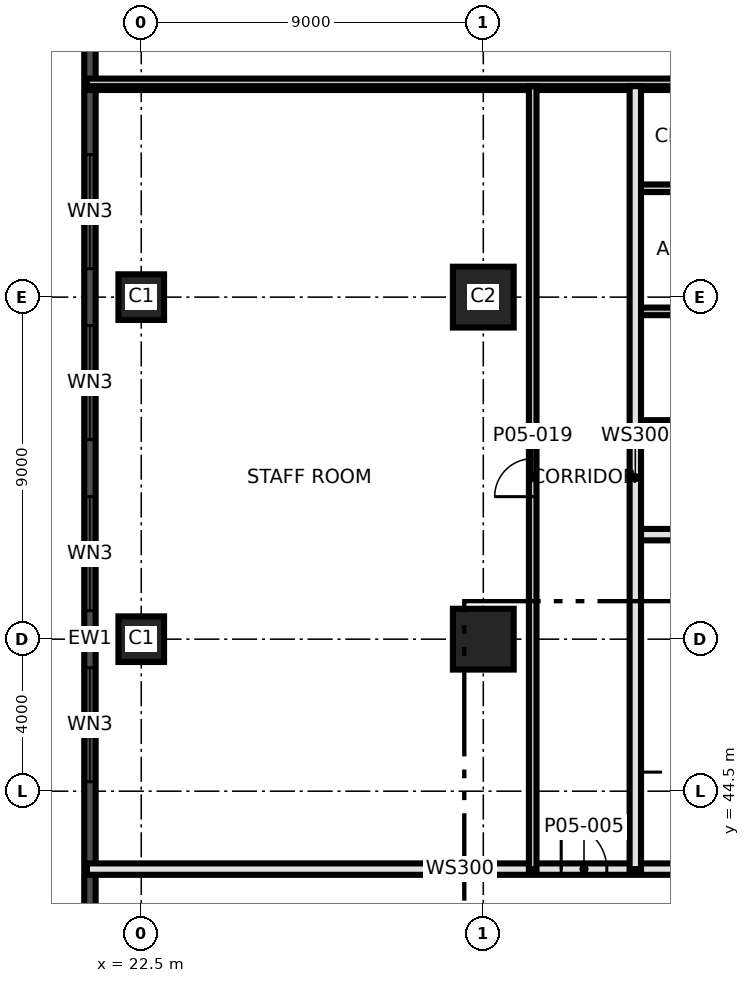
"""IFC4 building model, lengths in metres.
Left out: names, types, materials, properties, quantities, classifications, styles, units other than length and angle.
Written with IfcOpenShell. Run it as: python <this file> out.ifc"""

import sys

from ifc_helpers import new_model, si_unit, direction, frame, frame_2d, origin, origin_2d, place, context, subcontext, project, spatial, rectangle, extrude, element, fill, save


model = new_model("IFC4")
c1 = context("Model", 3, precision=1e-05, world=origin(), true_north=direction((0.0, 1.0)))
c2 = subcontext(c1, "Body", "Model", "MODEL_VIEW")
j1 = project(units=[si_unit("LENGTHUNIT", "METRE"), si_unit("PLANEANGLEUNIT", "RADIAN")], contexts=[c1])
p1 = place(None, origin())
s1 = spatial("IfcSite", under=j1, at=p1, CompositionType="ELEMENT")
p2 = place(p1, origin())
s2 = spatial("IfcBuilding", under=s1, at=p2, CompositionType="ELEMENT")
p3 = place(p2, frame((0.0, 0.0, 28.5)))
s3 = spatial("IfcBuildingStorey", under=s2, at=p3, CompositionType="ELEMENT", Elevation=28.5)
p4 = place(p3, frame((22.5, 48.5, 0.0), z_axis=(0.0, 0.0, 1.0), x_axis=(1.0, 0.0, 0.0)))
e1 = element("IfcColumn", 1, at=p4, inside=s3, PredefinedType="COLUMN", context=c2, shape_type="SweptSolid", body=[
    extrude(rectangle(XDim=1.2, YDim=1.2, at=origin_2d()), origin(), (0.0, 0.0, 1.0), 5.0),
])
p5 = place(p3, frame((31.5, 48.5, 0.0), z_axis=(0.0, 0.0, 1.0), x_axis=(1.0, 0.0, 0.0)))
e2 = element("IfcColumn", 2, at=p5, inside=s3, PredefinedType="COLUMN", context=c2, shape_type="SweptSolid", body=[
    extrude(rectangle(XDim=1.6, YDim=1.6, at=origin_2d()), origin(), (0.0, 0.0, 1.0), 5.0),
])
p6 = place(p3, frame((22.5, 57.5, 0.0), z_axis=(0.0, 0.0, 1.0), x_axis=(1.0, 0.0, 0.0)))
e3 = element("IfcColumn", 3, at=p6, inside=s3, PredefinedType="COLUMN", context=c2, shape_type="SweptSolid", body=[
    extrude(rectangle(XDim=1.2, YDim=1.2, at=origin_2d()), origin(), (0.0, 0.0, 1.0), 5.0),
])
p7 = place(p3, frame((31.5, 57.5, 0.0), z_axis=(0.0, 0.0, 1.0), x_axis=(1.0, 0.0, 0.0)))
e4 = element("IfcColumn", 4, at=p7, inside=s3, PredefinedType="COLUMN", context=c2, shape_type="SweptSolid", body=[
    extrude(rectangle(XDim=1.6, YDim=1.6, at=origin_2d()), origin(), (0.0, 0.0, 1.0), 5.0),
])
p8 = place(p3, frame((21.15, 79.952, 0.0), z_axis=(0.0, 0.0, 1.0), x_axis=(0.0, -1.0, 0.0)))
e5 = element("IfcWall", 5, at=p8, inside=s3, PredefinedType="SOLIDWALL", context=c2, shape_type="SweptSolid", body=[
    extrude(rectangle(XDim=62.88, YDim=0.3, at=frame_2d((31.44, 0.0))), origin(), (0.0, 0.0, 1.0), 4.7),
])
p9 = place(p8, frame((0.726, 0.0, 0.9)))
e6 = element("IfcOpeningElement", 6, at=p9, cuts=e5, PredefinedType="OPENING", context=c2, shape_type="SweptSolid", body=[
    extrude(rectangle(XDim=3.0, YDim=2.4, at=frame_2d((1.5, 1.2))), frame((0.0, 0.16, 0.0), z_axis=(0.0, -1.0, 0.0), x_axis=(1.0, 0.0, 0.0)), (0.0, 0.0, 1.0), 0.32),
])
p10 = place(p8, frame((5.202, 0.0, 0.9)))
e7 = element("IfcOpeningElement", 7, at=p10, cuts=e5, PredefinedType="OPENING", context=c2, shape_type="SweptSolid", body=[
    extrude(rectangle(XDim=3.0, YDim=2.4, at=frame_2d((1.5, 1.2))), frame((0.0, 0.16, 0.0), z_axis=(0.0, -1.0, 0.0), x_axis=(1.0, 0.0, 0.0)), (0.0, 0.0, 1.0), 0.32),
])
p11 = place(p8, frame((9.702, 0.0, 0.9)))
e8 = element("IfcOpeningElement", 8, at=p11, cuts=e5, PredefinedType="OPENING", context=c2, shape_type="SweptSolid", body=[
    extrude(rectangle(XDim=3.0, YDim=2.4, at=frame_2d((1.5, 1.2))), frame((0.0, 0.16, 0.0), z_axis=(0.0, -1.0, 0.0), x_axis=(1.0, 0.0, 0.0)), (0.0, 0.0, 1.0), 0.32),
])
p12 = place(p8, frame((18.702, 0.0, 0.9)))
e9 = element("IfcOpeningElement", 9, at=p12, cuts=e5, PredefinedType="OPENING", context=c2, shape_type="SweptSolid", body=[
    extrude(rectangle(XDim=3.0, YDim=2.4, at=frame_2d((1.5, 1.2))), frame((0.0, 0.16, 0.0), z_axis=(0.0, -1.0, 0.0), x_axis=(1.0, 0.0, 0.0)), (0.0, 0.0, 1.0), 0.32),
])
p13 = place(p8, frame((23.202, 0.0, 0.9)))
e10 = element("IfcOpeningElement", 10, at=p13, cuts=e5, PredefinedType="OPENING", context=c2, shape_type="SweptSolid", body=[
    extrude(rectangle(XDim=3.0, YDim=2.4, at=frame_2d((1.5, 1.2))), frame((0.0, 0.16, 0.0), z_axis=(0.0, -1.0, 0.0), x_axis=(1.0, 0.0, 0.0)), (0.0, 0.0, 1.0), 0.32),
])
p14 = place(p8, frame((27.702, 0.0, 0.9)))
e11 = element("IfcOpeningElement", 11, at=p14, cuts=e5, PredefinedType="OPENING", context=c2, shape_type="SweptSolid", body=[
    extrude(rectangle(XDim=3.0, YDim=2.4, at=frame_2d((1.5, 1.2))), frame((0.0, 0.16, 0.0), z_axis=(0.0, -1.0, 0.0), x_axis=(1.0, 0.0, 0.0)), (0.0, 0.0, 1.0), 0.32),
])
p15 = place(p8, frame((32.202, 0.0, 0.9)))
e12 = element("IfcOpeningElement", 12, at=p15, cuts=e5, PredefinedType="OPENING", context=c2, shape_type="SweptSolid", body=[
    extrude(rectangle(XDim=3.0, YDim=2.4, at=frame_2d((1.5, 1.2))), frame((0.0, 0.16, 0.0), z_axis=(0.0, -1.0, 0.0), x_axis=(1.0, 0.0, 0.0)), (0.0, 0.0, 1.0), 0.32),
])
p16 = place(p8, frame((41.202, 0.0, 0.9)))
e13 = element("IfcOpeningElement", 13, at=p16, cuts=e5, PredefinedType="OPENING", context=c2, shape_type="SweptSolid", body=[
    extrude(rectangle(XDim=3.0, YDim=2.4, at=frame_2d((1.5, 1.2))), frame((0.0, 0.16, 0.0), z_axis=(0.0, -1.0, 0.0), x_axis=(1.0, 0.0, 0.0)), (0.0, 0.0, 1.0), 0.32),
])
p17 = place(p8, frame((45.702, 0.0, 0.9)))
e14 = element("IfcOpeningElement", 14, at=p17, cuts=e5, PredefinedType="OPENING", context=c2, shape_type="SweptSolid", body=[
    extrude(rectangle(XDim=3.0, YDim=2.4, at=frame_2d((1.5, 1.2))), frame((0.0, 0.16, 0.0), z_axis=(0.0, -1.0, 0.0), x_axis=(1.0, 0.0, 0.0)), (0.0, 0.0, 1.0), 0.32),
])
p18 = place(p8, frame((50.202, 0.0, 0.9)))
e15 = element("IfcOpeningElement", 15, at=p18, cuts=e5, PredefinedType="OPENING", context=c2, shape_type="SweptSolid", body=[
    extrude(rectangle(XDim=3.0, YDim=2.4, at=frame_2d((1.5, 1.2))), frame((0.0, 0.16, 0.0), z_axis=(0.0, -1.0, 0.0), x_axis=(1.0, 0.0, 0.0)), (0.0, 0.0, 1.0), 0.32),
])
p19 = place(p8, frame((54.702, 0.0, 0.9)))
e16 = element("IfcOpeningElement", 16, at=p19, cuts=e5, PredefinedType="OPENING", context=c2, shape_type="SweptSolid", body=[
    extrude(rectangle(XDim=3.0, YDim=2.4, at=frame_2d((1.5, 1.2))), frame((0.0, 0.16, 0.0), z_axis=(0.0, -1.0, 0.0), x_axis=(1.0, 0.0, 0.0)), (0.0, 0.0, 1.0), 0.32),
])
p20 = place(p8, frame((59.226, 0.0, 0.9)))
e17 = element("IfcOpeningElement", 17, at=p20, cuts=e5, PredefinedType="OPENING", context=c2, shape_type="SweptSolid", body=[
    extrude(rectangle(XDim=3.0, YDim=2.4, at=frame_2d((1.5, 1.2))), frame((0.0, 0.16, 0.0), z_axis=(0.0, -1.0, 0.0), x_axis=(1.0, 0.0, 0.0)), (0.0, 0.0, 1.0), 0.32),
])
p21 = place(p3, frame((21.07, 42.45, 0.0), z_axis=(0.0, 0.0, 1.0), x_axis=(1.0, 0.0, 0.0)))
e18 = element("IfcWall", 18, at=p21, inside=s3, PredefinedType="SOLIDWALL", context=c2, shape_type="SweptSolid", body=[
    extrude(rectangle(XDim=19.63, YDim=0.3, at=frame_2d((9.815, 0.0))), origin(), (0.0, 0.0, 1.0), 4.7),
])
p22 = place(p21, frame((16.13, 0.0, 0.0)))
e19 = element("IfcOpeningElement", 19, at=p22, cuts=e18, PredefinedType="OPENING", context=c2, shape_type="SweptSolid", body=[
    extrude(rectangle(XDim=1.8, YDim=2.1, at=frame_2d((0.9, 1.05))), frame((0.0, 0.16, 0.0), z_axis=(0.0, -1.0, 0.0), x_axis=(1.0, 0.0, 0.0)), (0.0, 0.0, 1.0), 0.32),
])
p23 = place(p21, frame((12.48, 0.0, 0.0)))
e20 = element("IfcOpeningElement", 20, at=p23, cuts=e18, PredefinedType="OPENING", context=c2, shape_type="SweptSolid", body=[
    extrude(rectangle(XDim=1.2, YDim=2.1, at=frame_2d((0.6, 1.05))), frame((0.0, 0.16, 0.0), z_axis=(0.0, -1.0, 0.0), x_axis=(1.0, 0.0, 0.0)), (0.0, 0.0, 1.0), 0.32),
])
p24 = place(p3, frame((35.5, 51.25, 0.0), z_axis=(0.0, 0.0, 1.0), x_axis=(1.0, 0.0, 0.0)))
e21 = element("IfcWall", 21, at=p24, inside=s3, PredefinedType="SOLIDWALL", context=c2, shape_type="SweptSolid", body=[
    extrude(rectangle(XDim=5.2, YDim=0.3, at=frame_2d((2.6, 0.0))), origin(), (0.0, 0.0, 1.0), 4.7),
])
for number, where, z_axis, x_axis in (
    (22, (35.55, 54.162, 0.0), (0.0, 0.0, 1.0), (1.0, 0.0, 0.0)),
    (23, (35.55, 57.125, 0.0), (0.0, 0.0, 1.0), (1.0, 0.0, 0.0)),
    (24, (35.55, 60.364, 0.0), (0.0, 0.0, 1.0), (1.0, 0.0, 0.0)),
):
    element("IfcWall", number, at=place(p3, frame(where, z_axis=z_axis, x_axis=x_axis)), inside=s3, PredefinedType="PARTITIONING", context=c2, shape_type="SweptSolid", body=[
        extrude(rectangle(XDim=5.15, YDim=0.2, at=frame_2d((2.575, 0.0))), origin(), (0.0, 0.0, 1.0), 4.7),
    ])
p25 = place(p3, frame((21.07, 63.05, 0.0), z_axis=(0.0, 0.0, 1.0), x_axis=(1.0, 0.0, 0.0)))
e25 = element("IfcWall", 25, at=p25, inside=s3, PredefinedType="PARTITIONING", context=c2, shape_type="SweptSolid", body=[
    extrude(rectangle(XDim=14.43, YDim=0.2, at=frame_2d((7.215, 0.0))), origin(), (0.0, 0.0, 1.0), 4.7),
])
p26 = place(p3, frame((35.55, 63.05, 0.0), z_axis=(0.0, 0.0, 1.0), x_axis=(1.0, 0.0, 0.0)))
e26 = element("IfcWall", 26, at=p26, inside=s3, PredefinedType="PARTITIONING", context=c2, shape_type="SweptSolid", body=[
    extrude(rectangle(XDim=5.15, YDim=0.2, at=frame_2d((2.575, 0.0))), origin(), (0.0, 0.0, 1.0), 4.7),
])
p27 = place(p3, frame((21.07, 63.15, 0.0), z_axis=(0.0, 0.0, 1.0), x_axis=(1.0, 0.0, 0.0)))
e27 = element("IfcWall", 27, at=p27, inside=s3, PredefinedType="PARTITIONING", context=c2, shape_type="SweptSolid", body=[
    extrude(rectangle(XDim=19.63, YDim=0.2, at=frame_2d((9.815, 0.0))), origin(), (0.0, 0.0, 1.0), 4.7),
])
p28 = place(p3, frame((32.8, 42.45, 0.0), z_axis=(0.0, 0.0, 1.0), x_axis=(0.0, 1.0, 0.0)))
e28 = element("IfcWall", 28, at=p28, inside=s3, PredefinedType="PARTITIONING", context=c2, shape_type="SweptSolid", body=[
    extrude(rectangle(XDim=20.6, YDim=0.2, at=frame_2d((10.3, 0.0))), origin(), (0.0, 0.0, 1.0), 4.7),
])
p29 = place(p28, frame((9.8, 0.0, 0.0)))
e29 = element("IfcOpeningElement", 29, at=p29, cuts=e28, PredefinedType="OPENING", context=c2, shape_type="SweptSolid", body=[
    extrude(rectangle(XDim=1.0, YDim=2.1, at=frame_2d((0.5, 1.05))), frame((0.0, 0.11, 0.0), z_axis=(0.0, -1.0, 0.0), x_axis=(1.0, 0.0, 0.0)), (0.0, 0.0, 1.0), 0.22),
])
p30 = place(p3, frame((35.5, 42.45, 0.0), z_axis=(0.0, 0.0, 1.0), x_axis=(0.0, 1.0, 0.0)))
e30 = element("IfcWall", 30, at=p30, inside=s3, PredefinedType="SOLIDWALL", context=c2, shape_type="SweptSolid", body=[
    extrude(rectangle(XDim=20.6, YDim=0.3, at=frame_2d((10.3, 0.0))), origin(), (0.0, 0.0, 1.0), 4.7),
])
p31 = place(p12, origin())
e31 = element("IfcWindow", 31, at=p31, inside=s3, PartitioningType="SINGLE_PANEL", PredefinedType="WINDOW", context=c2, shape_type="SweptSolid", body=[
    extrude(rectangle(XDim=3.0, YDim=2.4, at=frame_2d((1.5, 1.2))), frame((0.0, 0.03, 0.0), z_axis=(0.0, -1.0, 0.0), x_axis=(1.0, 0.0, 0.0)), (0.0, 0.0, 1.0), 0.06),
])
fill(e9, e31)
p32 = place(p13, origin())
e32 = element("IfcWindow", 32, at=p32, inside=s3, PartitioningType="SINGLE_PANEL", PredefinedType="WINDOW", context=c2, shape_type="SweptSolid", body=[
    extrude(rectangle(XDim=3.0, YDim=2.4, at=frame_2d((1.5, 1.2))), frame((0.0, 0.03, 0.0), z_axis=(0.0, -1.0, 0.0), x_axis=(1.0, 0.0, 0.0)), (0.0, 0.0, 1.0), 0.06),
])
fill(e10, e32)
p33 = place(p14, origin())
e33 = element("IfcWindow", 33, at=p33, inside=s3, PartitioningType="SINGLE_PANEL", PredefinedType="WINDOW", context=c2, shape_type="SweptSolid", body=[
    extrude(rectangle(XDim=3.0, YDim=2.4, at=frame_2d((1.5, 1.2))), frame((0.0, 0.03, 0.0), z_axis=(0.0, -1.0, 0.0), x_axis=(1.0, 0.0, 0.0)), (0.0, 0.0, 1.0), 0.06),
])
fill(e11, e33)
p34 = place(p15, origin())
e34 = element("IfcWindow", 34, at=p34, inside=s3, PartitioningType="SINGLE_PANEL", PredefinedType="WINDOW", context=c2, shape_type="SweptSolid", body=[
    extrude(rectangle(XDim=3.0, YDim=2.4, at=frame_2d((1.5, 1.2))), frame((0.0, 0.03, 0.0), z_axis=(0.0, -1.0, 0.0), x_axis=(1.0, 0.0, 0.0)), (0.0, 0.0, 1.0), 0.06),
])
fill(e12, e34)
p35 = place(p23, origin())
e35 = element("IfcDoor", 35, at=p35, inside=s3, OperationType="SINGLE_SWING_LEFT", PredefinedType="DOOR", context=c2, shape_type="SweptSolid", body=[
    extrude(rectangle(XDim=1.2, YDim=2.1, at=frame_2d((0.6, 1.05))), frame((0.0, 0.025, 0.0), z_axis=(0.0, -1.0, 0.0), x_axis=(1.0, 0.0, 0.0)), (0.0, 0.0, 1.0), 0.05),
])
fill(e20, e35)
p36 = place(p29, origin())
e36 = element("IfcDoor", 36, at=p36, inside=s3, OperationType="SINGLE_SWING_LEFT", PredefinedType="DOOR", context=c2, shape_type="SweptSolid", body=[
    extrude(rectangle(XDim=1.0, YDim=2.1, at=frame_2d((0.5, 1.05))), frame((0.0, 0.025, 0.0), z_axis=(0.0, -1.0, 0.0), x_axis=(1.0, 0.0, 0.0)), (0.0, 0.0, 1.0), 0.05),
])
fill(e29, e36)
save(model, sys.argv[1])
